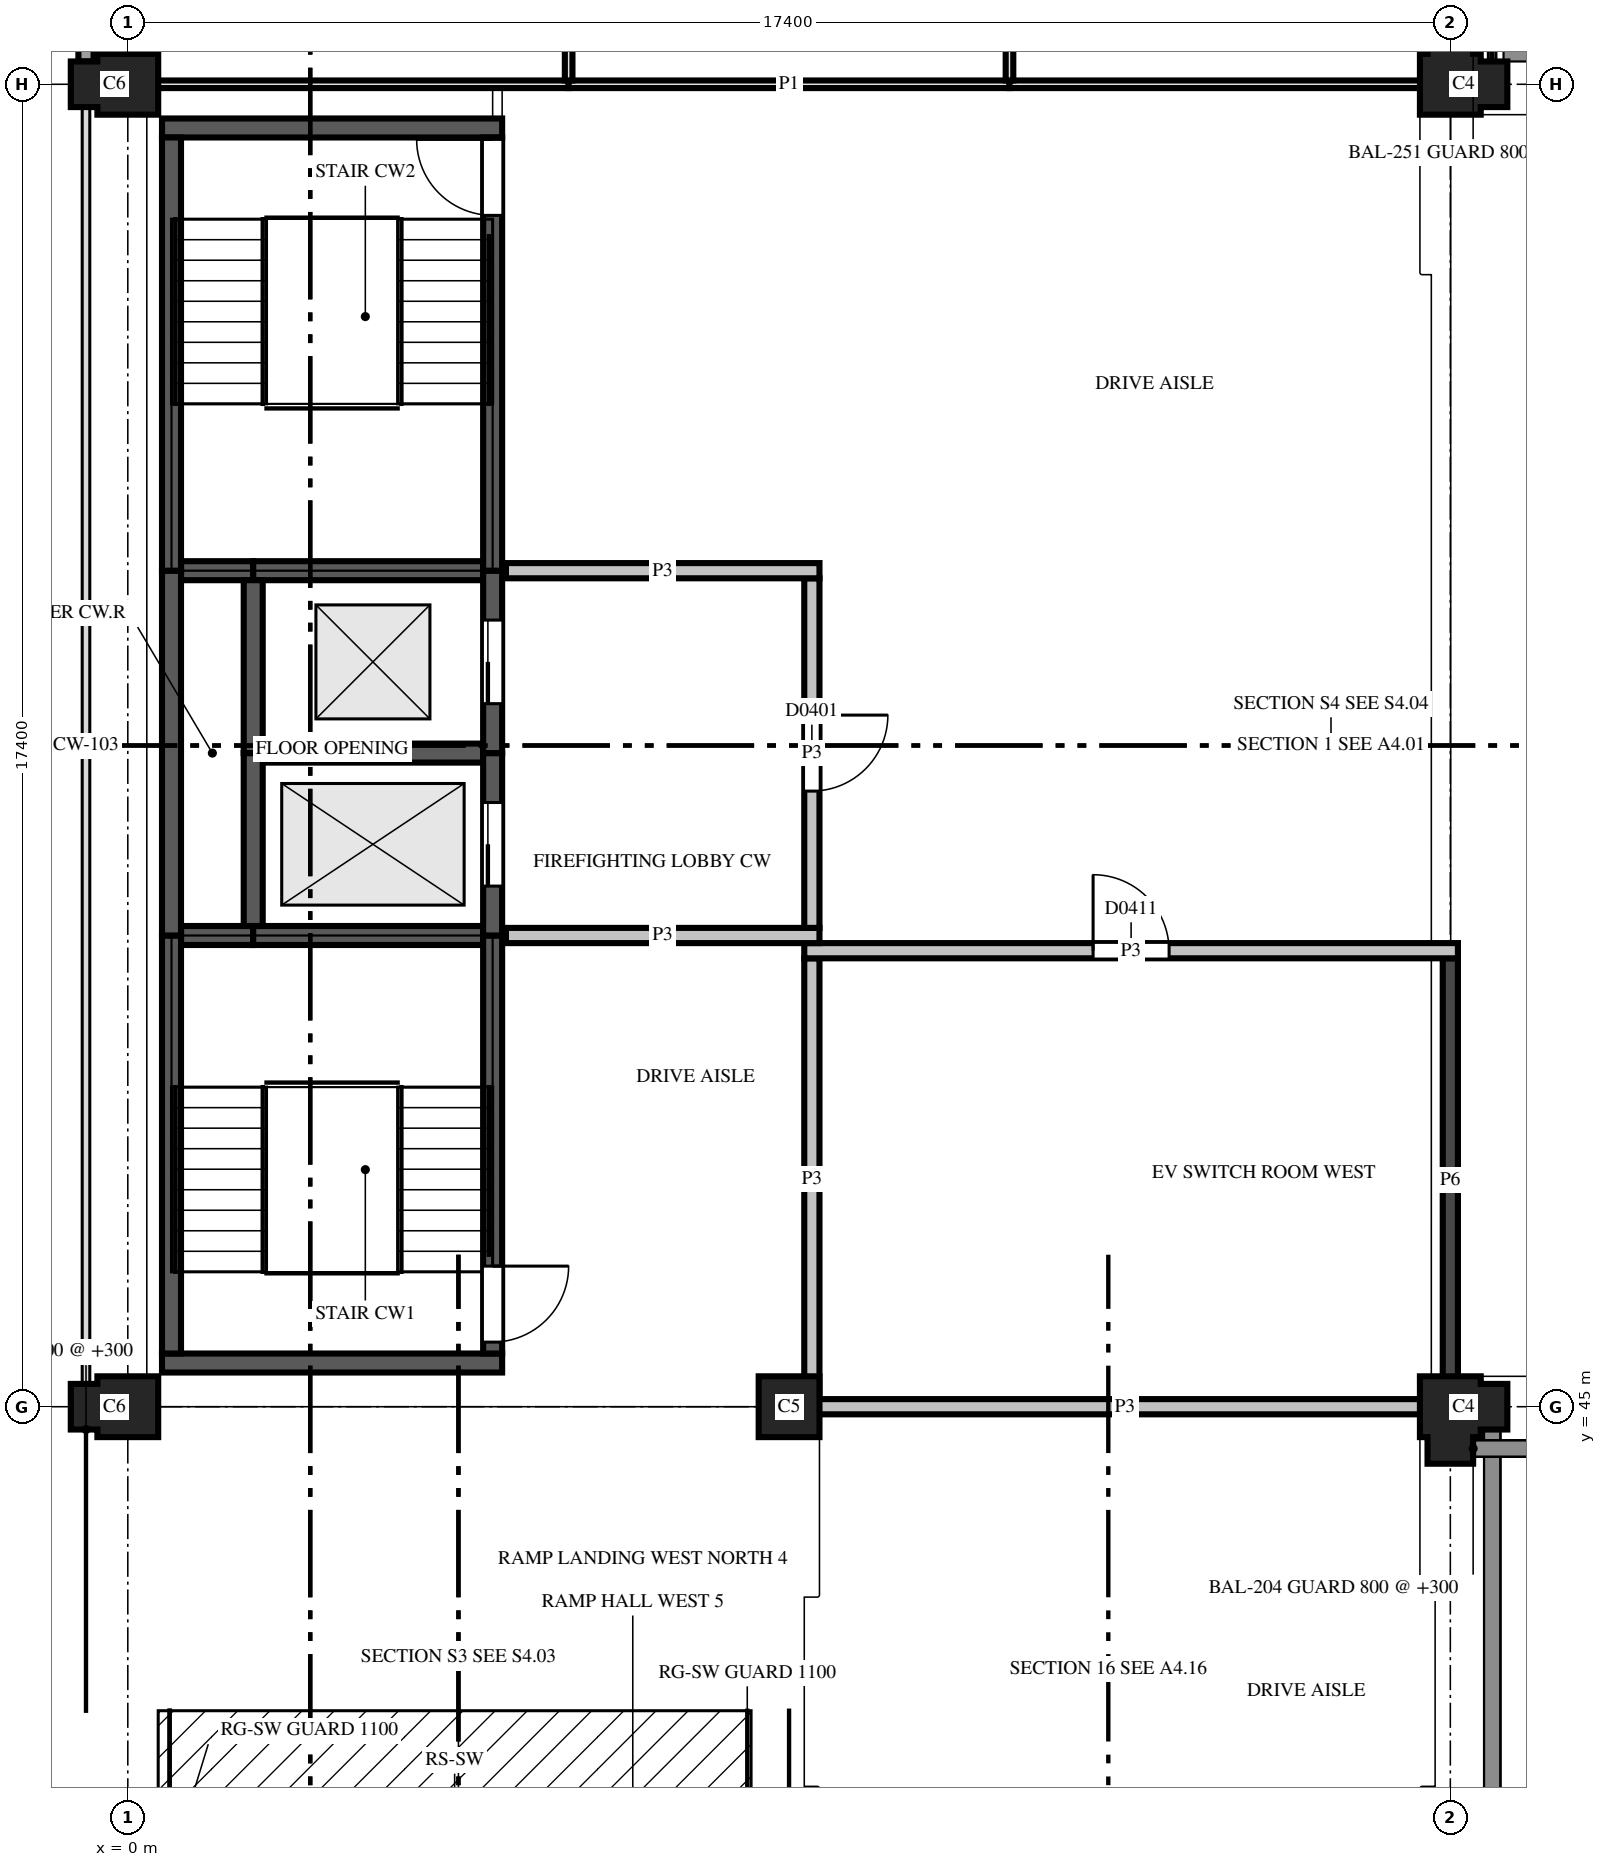
"""IFC4 building model, lengths in metres.
Left out: names, types, materials, properties, quantities, classifications, styles, units other than length and angle.
Written with IfcOpenShell. Run it as: python <this file> out.ifc"""

import sys

from ifc_helpers import new_model, si_unit, direction, frame, frame_2d, origin, place, context, subcontext, project, spatial, polyline, rectangle, outline, extrude, element, fill, save


model = new_model("IFC4")
c1 = context("Model", 3, precision=1e-05, world=origin(), true_north=direction((0.0, 1.0)))
c2 = subcontext(c1, "Body", "Model", "MODEL_VIEW")
j1 = project(units=[si_unit("LENGTHUNIT", "METRE"), si_unit("PLANEANGLEUNIT", "RADIAN")], contexts=[c1])
p1 = place(None, origin())
s1 = spatial("IfcSite", under=j1, at=p1, CompositionType="ELEMENT")
p2 = place(p1, origin())
s2 = spatial("IfcBuilding", under=s1, at=p2, CompositionType="ELEMENT")
p3 = place(p2, frame((0.0, 0.0, 15.6)))
s3 = spatial("IfcBuildingStorey", under=s2, at=p3, CompositionType="ELEMENT", Elevation=15.6)
p4 = place(p3, frame((0.0, 45.0, 0.0), z_axis=(0.0, 0.0, 1.0), x_axis=(-1.0, 0.0, 0.0)))
e1 = element("IfcColumn", 1, at=p4, inside=s3, PredefinedType="COLUMN", context=c2, shape_type="SweptSolid", body=[
    extrude(outline(polyline([(-0.4, -0.4), (0.4, -0.4), (0.4, -0.3), (0.75, -0.3), (0.75, 0.3), (0.4, 0.3), (0.4, 0.4), (-0.4, 0.4), (-0.4, -0.4)])), origin(), (0.0, 0.0, 1.0), 3.7),
])
p5 = place(p3, frame((8.7, 45.0, 0.0), z_axis=(0.0, 0.0, 1.0), x_axis=(1.0, 0.0, 0.0)))
e2 = element("IfcColumn", 2, at=p5, inside=s3, PredefinedType="COLUMN", context=c2, shape_type="SweptSolid", body=[
    extrude(outline(polyline([(-0.4, -0.4), (0.4, -0.4), (0.4, 0.4), (-0.4, 0.4), (-0.4, -0.4)])), origin(), (0.0, 0.0, 1.0), 3.7),
])
p6 = place(p3, frame((17.4, 45.0, 0.0), z_axis=(0.0, 0.0, 1.0), x_axis=(0.0, -1.0, 0.0)))
e3 = element("IfcColumn", 3, at=p6, inside=s3, PredefinedType="COLUMN", context=c2, shape_type="SweptSolid", body=[
    extrude(outline(polyline([(-0.4, -0.4), (0.4, -0.4), (0.4, -0.3), (0.75, -0.3), (0.75, 0.3), (0.4, 0.3), (0.4, 0.4), (0.3, 0.4), (0.3, 0.75), (-0.3, 0.75), (-0.3, 0.4), (-0.4, 0.4), (-0.4, -0.4)])), origin(), (0.0, 0.0, 1.0), 3.7),
])
p7 = place(p3, frame((0.0, 62.4, 0.0), z_axis=(0.0, 0.0, 1.0), x_axis=(-1.0, 0.0, 0.0)))
e4 = element("IfcColumn", 4, at=p7, inside=s3, PredefinedType="COLUMN", context=c2, shape_type="SweptSolid", body=[
    extrude(outline(polyline([(-0.4, -0.4), (0.4, -0.4), (0.4, -0.3), (0.75, -0.3), (0.75, 0.3), (0.4, 0.3), (0.4, 0.4), (-0.4, 0.4), (-0.4, -0.4)])), origin(), (0.0, 0.0, 1.0), 3.7),
])
p8 = place(p3, frame((17.4, 62.4, 0.0), z_axis=(0.0, 0.0, 1.0), x_axis=(1.0, 0.0, 0.0)))
e5 = element("IfcColumn", 5, at=p8, inside=s3, PredefinedType="COLUMN", context=c2, shape_type="SweptSolid", body=[
    extrude(outline(polyline([(-0.4, -0.4), (0.4, -0.4), (0.4, -0.3), (0.75, -0.3), (0.75, 0.3), (0.4, 0.3), (0.4, 0.4), (0.3, 0.4), (0.3, 0.75), (-0.3, 0.75), (-0.3, 0.4), (-0.4, 0.4), (-0.4, -0.4)])), origin(), (0.0, 0.0, 1.0), 3.7),
])
p9 = place(p3, frame((0.45, 45.575, 0.0), z_axis=(0.0, 0.0, 1.0), x_axis=(1.0, 0.0, 0.0)))
e6 = element("IfcWall", 6, at=p9, inside=s3, PredefinedType="SHEAR", context=c2, shape_type="SweptSolid", body=[
    extrude(rectangle(XDim=4.475, YDim=0.25, at=frame_2d((2.238, 0.0))), origin(), (0.0, 0.0, 1.0), 3.7),
])
p10 = place(p3, frame((0.7, 51.2, 0.0), z_axis=(0.0, 0.0, 1.0), x_axis=(1.0, 0.0, 0.0)))
e7 = element("IfcWall", 7, at=p10, inside=s3, PredefinedType="SHEAR", context=c2, shape_type="SweptSolid", body=[
    extrude(rectangle(XDim=0.95, YDim=0.25, at=frame_2d((0.475, 0.0))), origin(), (0.0, 0.0, 1.0), 3.7),
])
p11 = place(p3, frame((1.65, 51.2, 0.0), z_axis=(0.0, 0.0, 1.0), x_axis=(1.0, 0.0, 0.0)))
e8 = element("IfcWall", 8, at=p11, inside=s3, PredefinedType="SHEAR", context=c2, shape_type="SweptSolid", body=[
    extrude(rectangle(XDim=3.025, YDim=0.25, at=frame_2d((1.513, 0.0))), origin(), (0.0, 0.0, 1.0), 3.7),
])
p12 = place(p3, frame((1.775, 53.6, 0.0), z_axis=(0.0, 0.0, 1.0), x_axis=(1.0, 0.0, 0.0)))
e9 = element("IfcWall", 9, at=p12, inside=s3, PredefinedType="SHEAR", context=c2, shape_type="SweptSolid", body=[
    extrude(rectangle(XDim=2.9, YDim=0.25, at=frame_2d((1.45, 0.0))), origin(), (0.0, 0.0, 1.0), 3.7),
])
p13 = place(p3, frame((0.7, 56.0, 0.0), z_axis=(0.0, 0.0, 1.0), x_axis=(1.0, 0.0, 0.0)))
e10 = element("IfcWall", 10, at=p13, inside=s3, PredefinedType="SHEAR", context=c2, shape_type="SweptSolid", body=[
    extrude(rectangle(XDim=0.95, YDim=0.25, at=frame_2d((0.475, 0.0))), origin(), (0.0, 0.0, 1.0), 3.7),
])
p14 = place(p3, frame((1.65, 56.0, 0.0), z_axis=(0.0, 0.0, 1.0), x_axis=(1.0, 0.0, 0.0)))
e11 = element("IfcWall", 11, at=p14, inside=s3, PredefinedType="SHEAR", context=c2, shape_type="SweptSolid", body=[
    extrude(rectangle(XDim=3.025, YDim=0.25, at=frame_2d((1.513, 0.0))), origin(), (0.0, 0.0, 1.0), 3.7),
])
p15 = place(p3, frame((0.45, 61.825, 0.0), z_axis=(0.0, 0.0, 1.0), x_axis=(1.0, 0.0, 0.0)))
e12 = element("IfcWall", 12, at=p15, inside=s3, PredefinedType="SHEAR", context=c2, shape_type="SweptSolid", body=[
    extrude(rectangle(XDim=4.475, YDim=0.25, at=frame_2d((2.238, 0.0))), origin(), (0.0, 0.0, 1.0), 3.7),
])
p16 = place(p3, frame((0.575, 45.7, 0.0), z_axis=(0.0, 0.0, 1.0), x_axis=(0.0, 1.0, 0.0)))
e13 = element("IfcWall", 13, at=p16, inside=s3, PredefinedType="SHEAR", context=c2, shape_type="SweptSolid", body=[
    extrude(rectangle(XDim=5.5, YDim=0.25, at=frame_2d((2.75, 0.0))), origin(), (0.0, 0.0, 1.0), 3.7),
])
p17 = place(p3, frame((0.575, 51.2, 0.0), z_axis=(0.0, 0.0, 1.0), x_axis=(0.0, 1.0, 0.0)))
e14 = element("IfcWall", 14, at=p17, inside=s3, PredefinedType="SHEAR", context=c2, shape_type="SweptSolid", body=[
    extrude(rectangle(XDim=4.8, YDim=0.25, at=frame_2d((2.4, 0.0))), origin(), (0.0, 0.0, 1.0), 3.7),
])
p18 = place(p3, frame((0.575, 56.0, 0.0), z_axis=(0.0, 0.0, 1.0), x_axis=(0.0, 1.0, 0.0)))
e15 = element("IfcWall", 15, at=p18, inside=s3, PredefinedType="SHEAR", context=c2, shape_type="SweptSolid", body=[
    extrude(rectangle(XDim=5.7, YDim=0.25, at=frame_2d((2.85, 0.0))), origin(), (0.0, 0.0, 1.0), 3.7),
])
p19 = place(p3, frame((1.65, 51.325, 0.0), z_axis=(0.0, 0.0, 1.0), x_axis=(0.0, 1.0, 0.0)))
e16 = element("IfcWall", 16, at=p19, inside=s3, PredefinedType="SHEAR", context=c2, shape_type="SweptSolid", body=[
    extrude(rectangle(XDim=2.275, YDim=0.25, at=frame_2d((1.138, 0.0))), origin(), (0.0, 0.0, 1.0), 3.7),
])
p20 = place(p3, frame((1.65, 53.6, 0.0), z_axis=(0.0, 0.0, 1.0), x_axis=(0.0, 1.0, 0.0)))
e17 = element("IfcWall", 17, at=p20, inside=s3, PredefinedType="SHEAR", context=c2, shape_type="SweptSolid", body=[
    extrude(rectangle(XDim=2.275, YDim=0.25, at=frame_2d((1.137, 0.0))), origin(), (0.0, 0.0, 1.0), 3.7),
])
p21 = place(p3, frame((4.8, 45.7, 0.0), z_axis=(0.0, 0.0, 1.0), x_axis=(0.0, 1.0, 0.0)))
e18 = element("IfcWall", 18, at=p21, inside=s3, PredefinedType="SHEAR", context=c2, shape_type="SweptSolid", body=[
    extrude(rectangle(XDim=5.5, YDim=0.25, at=frame_2d((2.75, 0.0))), origin(), (0.0, 0.0, 1.0), 3.7),
])
p22 = place(p21, frame((0.15, 0.0, 0.0)))
e19 = element("IfcOpeningElement", 19, at=p22, cuts=e18, PredefinedType="OPENING", context=c2, shape_type="SweptSolid", body=[
    extrude(rectangle(XDim=1.0, YDim=2.1, at=frame_2d((0.5, 1.05))), frame((0.0, 0.135, 0.0), z_axis=(0.0, -1.0, 0.0), x_axis=(1.0, 0.0, 0.0)), (0.0, 0.0, 1.0), 0.27),
])
p23 = place(p3, frame((4.8, 51.2, 0.0), z_axis=(0.0, 0.0, 1.0), x_axis=(0.0, 1.0, 0.0)))
e20 = element("IfcWall", 20, at=p23, inside=s3, PredefinedType="SHEAR", context=c2, shape_type="SweptSolid", body=[
    extrude(rectangle(XDim=2.4, YDim=0.25, at=frame_2d((1.2, 0.0))), origin(), (0.0, 0.0, 1.0), 3.7),
])
p24 = place(p23, frame((0.65, 0.0, 0.0)))
e21 = element("IfcOpeningElement", 21, at=p24, cuts=e20, PredefinedType="OPENING", context=c2, shape_type="SweptSolid", body=[
    extrude(rectangle(XDim=1.1, YDim=2.1, at=frame_2d((0.55, 1.05))), frame((0.0, 0.135, 0.0), z_axis=(0.0, -1.0, 0.0), x_axis=(1.0, 0.0, 0.0)), (0.0, 0.0, 1.0), 0.27),
])
p25 = place(p3, frame((4.8, 53.6, 0.0), z_axis=(0.0, 0.0, 1.0), x_axis=(0.0, 1.0, 0.0)))
e22 = element("IfcWall", 22, at=p25, inside=s3, PredefinedType="SHEAR", context=c2, shape_type="SweptSolid", body=[
    extrude(rectangle(XDim=2.4, YDim=0.25, at=frame_2d((1.2, 0.0))), origin(), (0.0, 0.0, 1.0), 3.7),
])
p26 = place(p25, frame((0.65, 0.0, 0.0)))
e23 = element("IfcOpeningElement", 23, at=p26, cuts=e22, PredefinedType="OPENING", context=c2, shape_type="SweptSolid", body=[
    extrude(rectangle(XDim=1.1, YDim=2.1, at=frame_2d((0.55, 1.05))), frame((0.0, 0.135, 0.0), z_axis=(0.0, -1.0, 0.0), x_axis=(1.0, 0.0, 0.0)), (0.0, 0.0, 1.0), 0.27),
])
p27 = place(p3, frame((4.8, 56.0, 0.0), z_axis=(0.0, 0.0, 1.0), x_axis=(0.0, 1.0, 0.0)))
e24 = element("IfcWall", 24, at=p27, inside=s3, PredefinedType="SHEAR", context=c2, shape_type="SweptSolid", body=[
    extrude(rectangle(XDim=5.7, YDim=0.25, at=frame_2d((2.85, 0.0))), origin(), (0.0, 0.0, 1.0), 3.7),
])
p28 = place(p27, frame((4.675, 0.0, 0.0)))
e25 = element("IfcOpeningElement", 25, at=p28, cuts=e24, PredefinedType="OPENING", context=c2, shape_type="SweptSolid", body=[
    extrude(rectangle(XDim=1.0, YDim=2.1, at=frame_2d((0.5, 1.05))), frame((0.0, 0.135, 0.0), z_axis=(0.0, -1.0, 0.0), x_axis=(1.0, 0.0, 0.0)), (0.0, 0.0, 1.0), 0.27),
])
p29 = place(p3, frame((-0.55, 69.6, 0.0), z_axis=(0.0, 0.0, 1.0), x_axis=(0.0, -1.0, 0.0)))
e26 = element("IfcWall", 26, at=p29, inside=s3, PredefinedType="SOLIDWALL", context=c2, shape_type="SweptSolid", body=[
    extrude(rectangle(XDim=6.9, YDim=0.2, at=frame_2d((3.45, 0.0))), origin(), (0.0, 0.0, 1.0), 2.3),
])
p30 = place(p29, frame((2.25, 0.0, 0.55)))
e27 = element("IfcOpeningElement", 27, at=p30, cuts=e26, PredefinedType="OPENING", context=c2, shape_type="SweptSolid", body=[
    extrude(rectangle(XDim=2.4, YDim=1.0, at=frame_2d((1.2, 0.5))), frame((0.0, 0.11, 0.0), z_axis=(0.0, -1.0, 0.0), x_axis=(1.0, 0.0, 0.0)), (0.0, 0.0, 1.0), 0.22),
])
p31 = place(p3, frame((8.9, 45.0, 0.0), z_axis=(0.0, 0.0, 1.0), x_axis=(1.0, 0.0, 0.0)))
e28 = element("IfcWall", 28, at=p31, inside=s3, PredefinedType="PARTITIONING", context=c2, shape_type="SweptSolid", body=[
    extrude(rectangle(XDim=8.44, YDim=0.2, at=frame_2d((4.22, 0.0))), origin(), (0.0, 0.0, 1.0), 2.88),
])
p32 = place(p3, frame((17.4, 45.06, 0.0), z_axis=(0.0, 0.0, 1.0), x_axis=(0.0, 1.0, 0.0)))
e29 = element("IfcWall", 29, at=p32, inside=s3, PredefinedType="PARTITIONING", context=c2, shape_type="SweptSolid", body=[
    extrude(rectangle(XDim=5.84, YDim=0.2, at=frame_2d((2.92, 0.0))), origin(), (0.0, 0.0, 1.0), 2.2),
])
p33 = place(p3, frame((9.0, 50.9, 0.0), z_axis=(0.0, 0.0, 1.0), x_axis=(0.0, -1.0, 0.0)))
e30 = element("IfcWall", 30, at=p33, inside=s3, PredefinedType="PARTITIONING", context=c2, shape_type="SweptSolid", body=[
    extrude(rectangle(XDim=5.8, YDim=0.2, at=frame_2d((2.9, 0.0))), origin(), (0.0, 0.0, 1.0), 2.88),
])
p34 = place(p3, frame((17.5, 51.0, 0.0), z_axis=(0.0, 0.0, 1.0), x_axis=(-1.0, 0.0, 0.0)))
e31 = element("IfcWall", 31, at=p34, inside=s3, PredefinedType="PARTITIONING", context=c2, shape_type="SweptSolid", body=[
    extrude(rectangle(XDim=8.6, YDim=0.2, at=frame_2d((4.3, 0.0))), origin(), (0.0, 0.0, 1.0), 2.88),
])
p35 = place(p34, frame((3.8, 0.0, 0.0)))
e32 = element("IfcOpeningElement", 32, at=p35, cuts=e31, PredefinedType="OPENING", context=c2, shape_type="SweptSolid", body=[
    extrude(rectangle(XDim=1.0, YDim=2.1, at=frame_2d((0.5, 1.05))), frame((0.0, 0.11, 0.0), z_axis=(0.0, -1.0, 0.0), x_axis=(1.0, 0.0, 0.0)), (0.0, 0.0, 1.0), 0.22),
])
p36 = place(p3, frame((4.975, 51.2, 0.0), z_axis=(0.0, 0.0, 1.0), x_axis=(1.0, 0.0, 0.0)))
e33 = element("IfcWall", 33, at=p36, inside=s3, PredefinedType="PARTITIONING", context=c2, shape_type="SweptSolid", body=[
    extrude(rectangle(XDim=4.125, YDim=0.2, at=frame_2d((2.062, 0.0))), origin(), (0.0, 0.0, 1.0), 2.88),
])
p37 = place(p3, frame((9.0, 51.3, 0.0), z_axis=(0.0, 0.0, 1.0), x_axis=(0.0, 1.0, 0.0)))
e34 = element("IfcWall", 34, at=p37, inside=s3, PredefinedType="PARTITIONING", context=c2, shape_type="SweptSolid", body=[
    extrude(rectangle(XDim=4.6, YDim=0.2, at=frame_2d((2.3, 0.0))), origin(), (0.0, 0.0, 1.0), 2.88),
])
p38 = place(p37, frame((1.8, 0.0, 0.0)))
e35 = element("IfcOpeningElement", 35, at=p38, cuts=e34, PredefinedType="OPENING", context=c2, shape_type="SweptSolid", body=[
    extrude(rectangle(XDim=1.0, YDim=2.1, at=frame_2d((0.5, 1.05))), frame((0.0, 0.11, 0.0), z_axis=(0.0, -1.0, 0.0), x_axis=(1.0, 0.0, 0.0)), (0.0, 0.0, 1.0), 0.22),
])
p39 = place(p3, frame((9.1, 56.0, 0.0), z_axis=(0.0, 0.0, 1.0), x_axis=(-1.0, 0.0, 0.0)))
e36 = element("IfcWall", 36, at=p39, inside=s3, PredefinedType="PARTITIONING", context=c2, shape_type="SweptSolid", body=[
    extrude(rectangle(XDim=4.125, YDim=0.2, at=frame_2d((2.062, 0.0))), origin(), (0.0, 0.0, 1.0), 2.88),
])
p40 = place(p3, frame((0.06, 62.4, 0.0), z_axis=(0.0, 0.0, 1.0), x_axis=(1.0, 0.0, 0.0)))
e37 = element("IfcWall", 37, at=p40, inside=s3, PredefinedType="PARTITIONING", context=c2, shape_type="SweptSolid", body=[
    extrude(rectangle(XDim=5.74, YDim=0.1, at=frame_2d((2.87, 0.0))), origin(), (0.0, 0.0, 1.0), 2.88),
])
p41 = place(p3, frame((5.8, 62.4, 0.0), z_axis=(0.0, 0.0, 1.0), x_axis=(1.0, 0.0, 0.0)))
e38 = element("IfcWall", 38, at=p41, inside=s3, PredefinedType="PARTITIONING", context=c2, shape_type="SweptSolid", body=[
    extrude(rectangle(XDim=5.8, YDim=0.1, at=frame_2d((2.9, 0.0))), origin(), (0.0, 0.0, 1.0), 2.88),
])
p42 = place(p3, frame((5.8, 62.45, 0.0), z_axis=(0.0, 0.0, 1.0), x_axis=(0.0, 1.0, 0.0)))
e39 = element("IfcWall", 39, at=p42, inside=s3, PredefinedType="PARTITIONING", context=c2, shape_type="SweptSolid", body=[
    extrude(rectangle(XDim=22.4, YDim=0.1, at=frame_2d((11.2, 0.0))), origin(), (0.0, 0.0, 1.0), 2.88),
])
p43 = place(p3, frame((11.6, 62.4, 0.0), z_axis=(0.0, 0.0, 1.0), x_axis=(1.0, 0.0, 0.0)))
e40 = element("IfcWall", 40, at=p43, inside=s3, PredefinedType="PARTITIONING", context=c2, shape_type="SweptSolid", body=[
    extrude(rectangle(XDim=5.74, YDim=0.1, at=frame_2d((2.87, 0.0))), origin(), (0.0, 0.0, 1.0), 2.88),
])
p44 = place(p3, frame((11.6, 62.45, 0.0), z_axis=(0.0, 0.0, 1.0), x_axis=(0.0, 1.0, 0.0)))
e41 = element("IfcWall", 41, at=p44, inside=s3, PredefinedType="PARTITIONING", context=c2, shape_type="SweptSolid", body=[
    extrude(rectangle(XDim=22.4, YDim=0.1, at=frame_2d((11.2, 0.0))), origin(), (0.0, 0.0, 1.0), 2.88),
])
p45 = place(p38, origin())
e42 = element("IfcDoor", 42, at=p45, inside=s3, OperationType="SINGLE_SWING_RIGHT", PredefinedType="DOOR", context=c2, shape_type="SweptSolid", body=[
    extrude(rectangle(XDim=1.0, YDim=2.1, at=frame_2d((0.5, 1.05))), frame((0.0, 0.025, 0.0), z_axis=(0.0, -1.0, 0.0), x_axis=(1.0, 0.0, 0.0)), (0.0, 0.0, 1.0), 0.05),
])
fill(e35, e42)
p46 = place(p35, origin())
e43 = element("IfcDoor", 43, at=p46, inside=s3, OperationType="SINGLE_SWING_RIGHT", PredefinedType="DOOR", context=c2, shape_type="SweptSolid", body=[
    extrude(rectangle(XDim=1.0, YDim=2.1, at=frame_2d((0.5, 1.05))), frame((0.0, 0.025, 0.0), z_axis=(0.0, -1.0, 0.0), x_axis=(1.0, 0.0, 0.0)), (0.0, 0.0, 1.0), 0.05),
])
fill(e32, e43)
p47 = place(p24, origin())
e44 = element("IfcDoor", 44, at=p47, inside=s3, OperationType="SLIDING_TO_LEFT", PredefinedType="DOOR", context=c2, shape_type="SweptSolid", body=[
    extrude(rectangle(XDim=1.1, YDim=2.1, at=frame_2d((0.55, 1.05))), frame((0.0, 0.025, 0.0), z_axis=(0.0, -1.0, 0.0), x_axis=(1.0, 0.0, 0.0)), (0.0, 0.0, 1.0), 0.05),
])
fill(e21, e44)
p48 = place(p26, origin())
e45 = element("IfcDoor", 45, at=p48, inside=s3, OperationType="SLIDING_TO_LEFT", PredefinedType="DOOR", context=c2, shape_type="SweptSolid", body=[
    extrude(rectangle(XDim=1.1, YDim=2.1, at=frame_2d((0.55, 1.05))), frame((0.0, 0.025, 0.0), z_axis=(0.0, -1.0, 0.0), x_axis=(1.0, 0.0, 0.0)), (0.0, 0.0, 1.0), 0.05),
])
fill(e23, e45)
p49 = place(p28, origin())
e46 = element("IfcDoor", 46, at=p49, inside=s3, OperationType="SINGLE_SWING_LEFT", PredefinedType="DOOR", context=c2, shape_type="SweptSolid", body=[
    extrude(rectangle(XDim=1.0, YDim=2.1, at=frame_2d((0.5, 1.05))), frame((0.0, 0.025, 0.0), z_axis=(0.0, -1.0, 0.0), x_axis=(1.0, 0.0, 0.0)), (0.0, 0.0, 1.0), 0.05),
])
fill(e25, e46)
p50 = place(p22, origin())
e47 = element("IfcDoor", 47, at=p50, inside=s3, OperationType="SINGLE_SWING_RIGHT", PredefinedType="DOOR", context=c2, shape_type="SweptSolid", body=[
    extrude(rectangle(XDim=1.0, YDim=2.1, at=frame_2d((0.5, 1.05))), frame((0.0, 0.025, 0.0), z_axis=(0.0, -1.0, 0.0), x_axis=(1.0, 0.0, 0.0)), (0.0, 0.0, 1.0), 0.05),
])
fill(e19, e47)
save(model, sys.argv[1])
